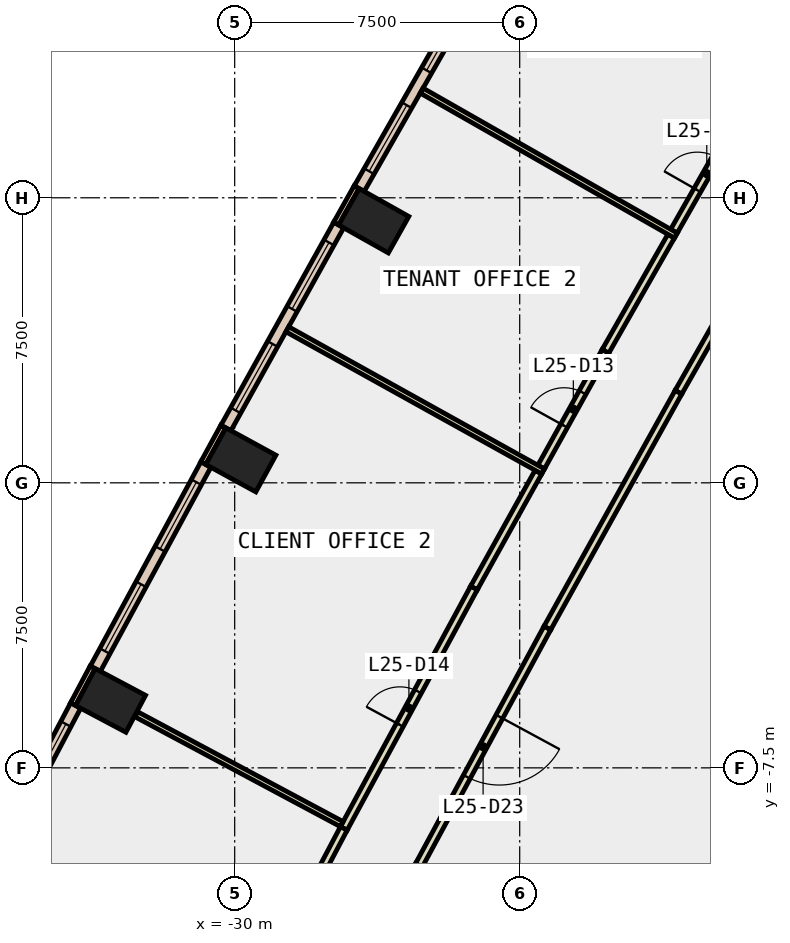
"""IFC4 building model, lengths in metres.
Left out: names, types, materials, properties, quantities, classifications, styles, units other than length and angle.
Written with IfcOpenShell. Run it as: python <this file> out.ifc"""

import sys

from ifc_helpers import new_model, si_unit, direction, frame, frame_2d, origin, origin_2d, place, context, subcontext, project, spatial, rectangle, extrude, element, fill, save


model = new_model("IFC4")
c1 = context("Model", 3, precision=1e-05, world=origin(), true_north=direction((0.0, 1.0)))
c2 = subcontext(c1, "Body", "Model", "MODEL_VIEW")
j1 = project(units=[si_unit("LENGTHUNIT", "METRE"), si_unit("PLANEANGLEUNIT", "RADIAN")], contexts=[c1])
p1 = place(None, origin())
s1 = spatial("IfcSite", under=j1, at=p1, CompositionType="ELEMENT")
p2 = place(p1, origin())
s2 = spatial("IfcBuilding", under=s1, at=p2, CompositionType="ELEMENT")
p3 = place(p2, frame((0.0, 0.0, 116.0)))
s3 = spatial("IfcBuildingStorey", under=s2, at=p3, CompositionType="ELEMENT", Elevation=116.0)
for number, where, z_axis, x_axis in (
    (1, (-26.341, 6.896, -0.4), (0.0, 0.0, 1.0), (0.49, 0.872, 0.0)),
    (2, (-29.838, 0.604, -0.4), (0.0, 0.0, 1.0), (0.48, 0.877, 0.0)),
    (3, (-33.266, -5.726, -0.4), (0.0, 0.0, 1.0), (0.469, 0.883, 0.0)),
):
    element("IfcColumn", number, at=place(p3, frame(where, z_axis=z_axis, x_axis=x_axis)), inside=s3, PredefinedType="COLUMN", context=c2, shape_type="SweptSolid", body=[
        extrude(rectangle(XDim=1.1, YDim=1.5, at=origin_2d()), origin(), (0.0, 0.0, 1.0), 4.2),
    ])
p4 = place(p3, frame((-26.791, 7.78, 0.0), z_axis=(0.0, 0.0, 1.0), x_axis=(-0.490008344094, -0.871717742574, 0.0)))
e4 = element("IfcWall", 4, at=p4, inside=s3, PredefinedType="STANDARD", context=c2, shape_type="SweptSolid", body=[
    extrude(rectangle(XDim=1.1, YDim=0.15, at=frame_2d((0.55, 0.0))), origin(), (0.0, 0.0, 1.0), 3.8),
])
p5 = place(p3, frame((-30.298, 1.483, 0.0), z_axis=(0.0, 0.0, 1.0), x_axis=(-0.479566870346, -0.877505337229, 0.0)))
e5 = element("IfcWall", 5, at=p5, inside=s3, PredefinedType="STANDARD", context=c2, shape_type="SweptSolid", body=[
    extrude(rectangle(XDim=1.101, YDim=0.15, at=frame_2d((0.55, 0.0))), origin(), (0.0, 0.0, 1.0), 3.8),
])
p6 = place(p3, frame((-33.737, -4.854, 0.0), z_axis=(0.0, 0.0, 1.0), x_axis=(-0.46919310775, -0.883095593716, 0.0)))
e6 = element("IfcWall", 6, at=p6, inside=s3, PredefinedType="STANDARD", context=c2, shape_type="SweptSolid", body=[
    extrude(rectangle(XDim=1.099, YDim=0.15, at=frame_2d((0.55, 0.0))), origin(), (0.0, 0.0, 1.0), 3.8),
])
p7 = place(p3, frame((-23.698, 13.048, 0.0), z_axis=(0.0, 0.0, 1.0), x_axis=(-0.495114366991, -0.868827810098, 0.0)))
e7 = element("IfcWall", 7, at=p7, inside=s3, PredefinedType="STANDARD", context=c2, shape_type="SweptSolid", body=[
    extrude(rectangle(XDim=6.11, YDim=0.3, at=frame_2d((3.055, 0.0))), origin(), (0.0, 0.0, 1.0), 3.8),
])
p8 = place(p7, frame((0.527, 0.0, 0.9)))
e8 = element("IfcOpeningElement", 8, at=p8, cuts=e7, PredefinedType="OPENING", context=c2, shape_type="SweptSolid", body=[
    extrude(rectangle(XDim=2.0, YDim=2.6, at=frame_2d((1.0, 1.3))), frame((0.0, 0.16, 0.0), z_axis=(0.0, -1.0, 0.0), x_axis=(1.0, 0.0, 0.0)), (0.0, 0.0, 1.0), 0.32),
])
p9 = place(p7, frame((3.582, 0.0, 0.9)))
e9 = element("IfcOpeningElement", 9, at=p9, cuts=e7, PredefinedType="OPENING", context=c2, shape_type="SweptSolid", body=[
    extrude(rectangle(XDim=2.0, YDim=2.6, at=frame_2d((1.0, 1.3))), frame((0.0, 0.16, 0.0), z_axis=(0.0, -1.0, 0.0), x_axis=(1.0, 0.0, 0.0)), (0.0, 0.0, 1.0), 0.32),
])
p10 = place(p3, frame((-27.262, 6.784, 0.0), z_axis=(0.0, 0.0, 1.0), x_axis=(-0.485822751649, -0.874057351654, 0.0)))
e10 = element("IfcWall", 10, at=p10, inside=s3, PredefinedType="STANDARD", context=c2, shape_type="SweptSolid", body=[
    extrude(rectangle(XDim=6.109, YDim=0.3, at=frame_2d((3.055, 0.0))), origin(), (0.0, 0.0, 1.0), 3.8),
])
p11 = place(p10, frame((0.527, 0.0, 0.9)))
e11 = element("IfcOpeningElement", 11, at=p11, cuts=e10, PredefinedType="OPENING", context=c2, shape_type="SweptSolid", body=[
    extrude(rectangle(XDim=2.0, YDim=2.6, at=frame_2d((1.0, 1.3))), frame((0.0, 0.16, 0.0), z_axis=(0.0, -1.0, 0.0), x_axis=(1.0, 0.0, 0.0)), (0.0, 0.0, 1.0), 0.32),
])
p12 = place(p10, frame((3.582, 0.0, 0.9)))
e12 = element("IfcOpeningElement", 12, at=p12, cuts=e10, PredefinedType="OPENING", context=c2, shape_type="SweptSolid", body=[
    extrude(rectangle(XDim=2.0, YDim=2.6, at=frame_2d((1.0, 1.3))), frame((0.0, 0.16, 0.0), z_axis=(0.0, -1.0, 0.0), x_axis=(1.0, 0.0, 0.0)), (0.0, 0.0, 1.0), 0.32),
])
p13 = place(p3, frame((-30.758, 0.481, 0.0), z_axis=(0.0, 0.0, 1.0), x_axis=(-0.476097776444, -0.879392351152, 0.0)))
e13 = element("IfcWall", 13, at=p13, inside=s3, PredefinedType="STANDARD", context=c2, shape_type="SweptSolid", body=[
    extrude(rectangle(XDim=6.11, YDim=0.3, at=frame_2d((3.055, 0.0))), origin(), (0.0, 0.0, 1.0), 3.8),
])
p14 = place(p13, frame((0.527, 0.0, 0.9)))
e14 = element("IfcOpeningElement", 14, at=p14, cuts=e13, PredefinedType="OPENING", context=c2, shape_type="SweptSolid", body=[
    extrude(rectangle(XDim=2.0, YDim=2.6, at=frame_2d((1.0, 1.3))), frame((0.0, 0.16, 0.0), z_axis=(0.0, -1.0, 0.0), x_axis=(1.0, 0.0, 0.0)), (0.0, 0.0, 1.0), 0.32),
])
p15 = place(p13, frame((3.582, 0.0, 0.9)))
e15 = element("IfcOpeningElement", 15, at=p15, cuts=e13, PredefinedType="OPENING", context=c2, shape_type="SweptSolid", body=[
    extrude(rectangle(XDim=2.0, YDim=2.6, at=frame_2d((1.0, 1.3))), frame((0.0, 0.16, 0.0), z_axis=(0.0, -1.0, 0.0), x_axis=(1.0, 0.0, 0.0)), (0.0, 0.0, 1.0), 0.32),
])
p16 = place(p3, frame((-34.185, -5.86, 0.0), z_axis=(0.0, 0.0, 1.0), x_axis=(-0.466599547852, -0.88446868907, 0.0)))
e16 = element("IfcWall", 16, at=p16, inside=s3, PredefinedType="STANDARD", context=c2, shape_type="SweptSolid", body=[
    extrude(rectangle(XDim=6.202, YDim=0.3, at=frame_2d((3.101, 0.0))), origin(), (0.0, 0.0, 1.0), 3.8),
])
p17 = place(p16, frame((0.551, 0.0, 0.9)))
e17 = element("IfcOpeningElement", 17, at=p17, cuts=e16, PredefinedType="OPENING", context=c2, shape_type="SweptSolid", body=[
    extrude(rectangle(XDim=2.0, YDim=2.6, at=frame_2d((1.0, 1.3))), frame((0.0, 0.16, 0.0), z_axis=(0.0, -1.0, 0.0), x_axis=(1.0, 0.0, 0.0)), (0.0, 0.0, 1.0), 0.32),
])
p18 = place(p16, frame((3.652, 0.0, 0.9)))
e18 = element("IfcOpeningElement", 18, at=p18, cuts=e16, PredefinedType="OPENING", context=c2, shape_type="SweptSolid", body=[
    extrude(rectangle(XDim=2.0, YDim=2.6, at=frame_2d((1.0, 1.3))), frame((0.0, 0.16, 0.0), z_axis=(0.0, -1.0, 0.0), x_axis=(1.0, 0.0, 0.0)), (0.0, 0.0, 1.0), 0.32),
])
p19 = place(p3, frame((-16.783, 5.088, 0.0), z_axis=(0.0, 0.0, 1.0), x_axis=(-0.495023676383, -0.868879485211, 0.0)))
e19 = element("IfcWall", 19, at=p19, inside=s3, PredefinedType="PARTITIONING", context=c2, shape_type="SweptSolid", body=[
    extrude(rectangle(XDim=3.113, YDim=0.2, at=frame_2d((1.557, 0.0))), origin(), (0.0, 0.0, 1.0), 3.8),
])
p20 = place(p3, frame((-18.324, 2.383, 0.0), z_axis=(0.0, 0.0, 1.0), x_axis=(-0.485826874234, -0.874055060206, 0.0)))
e20 = element("IfcWall", 20, at=p20, inside=s3, PredefinedType="PARTITIONING", context=c2, shape_type="SweptSolid", body=[
    extrude(rectangle(XDim=7.099, YDim=0.2, at=frame_2d((3.55, 0.0))), origin(), (0.0, 0.0, 1.0), 3.8),
])
p21 = place(p3, frame((-21.773, -3.822, 0.0), z_axis=(0.0, 0.0, 1.0), x_axis=(-0.476124717613, -0.87937776483, 0.0)))
e21 = element("IfcWall", 21, at=p21, inside=s3, PredefinedType="PARTITIONING", context=c2, shape_type="SweptSolid", body=[
    extrude(rectangle(XDim=7.099, YDim=0.2, at=frame_2d((3.55, 0.0))), origin(), (0.0, 0.0, 1.0), 3.8),
])
p22 = place(p21, frame((2.65, 0.0, 0.0)))
e22 = element("IfcOpeningElement", 22, at=p22, cuts=e21, PredefinedType="OPENING", context=c2, shape_type="SweptSolid", body=[
    extrude(rectangle(XDim=1.8, YDim=2.1, at=frame_2d((0.9, 1.05))), frame((0.0, 0.11, 0.0), z_axis=(0.0, -1.0, 0.0), x_axis=(1.0, 0.0, 0.0)), (0.0, 0.0, 1.0), 0.22),
])
p23 = place(p3, frame((-25.153, -10.065, 0.0), z_axis=(0.0, 0.0, 1.0), x_axis=(-0.466663976618, -0.884434696813, 0.0)))
e23 = element("IfcWall", 23, at=p23, inside=s3, PredefinedType="PARTITIONING", context=c2, shape_type="SweptSolid", body=[
    extrude(rectangle(XDim=6.501, YDim=0.2, at=frame_2d((3.25, 0.0))), origin(), (0.0, 0.0, 1.0), 3.8),
])
p24 = place(p3, frame((-18.441, 6.621, 0.0), z_axis=(0.0, 0.0, 1.0), x_axis=(0.495286549488, 0.868729666753, 0.0)))
e24 = element("IfcWall", 24, at=p24, inside=s3, PredefinedType="PARTITIONING", context=c2, shape_type="SweptSolid", body=[
    extrude(rectangle(XDim=3.487, YDim=0.2, at=frame_2d((1.743, 0.0))), origin(), (0.0, 0.0, 1.0), 3.8),
])
p25 = place(p24, frame((1.243, 0.0, 0.0)))
e25 = element("IfcOpeningElement", 25, at=p25, cuts=e24, PredefinedType="OPENING", context=c2, shape_type="SweptSolid", body=[
    extrude(rectangle(XDim=1.0, YDim=2.1, at=frame_2d((0.5, 1.05))), frame((0.0, 0.11, 0.0), z_axis=(0.0, -1.0, 0.0), x_axis=(1.0, 0.0, 0.0)), (0.0, 0.0, 1.0), 0.22),
])
p26 = place(p3, frame((-21.936, 0.414, 0.0), z_axis=(0.0, 0.0, 1.0), x_axis=(0.485827202541, 0.874054877723, 0.0)))
e26 = element("IfcWall", 26, at=p26, inside=s3, PredefinedType="PARTITIONING", context=c2, shape_type="SweptSolid", body=[
    extrude(rectangle(XDim=3.487, YDim=0.2, at=frame_2d((1.744, 0.0))), origin(), (0.0, 0.0, 1.0), 3.8),
])
p27 = place(p26, frame((1.244, 0.0, 0.0)))
e27 = element("IfcOpeningElement", 27, at=p27, cuts=e26, PredefinedType="OPENING", context=c2, shape_type="SweptSolid", body=[
    extrude(rectangle(XDim=1.0, YDim=2.1, at=frame_2d((0.5, 1.05))), frame((0.0, 0.11, 0.0), z_axis=(0.0, -1.0, 0.0), x_axis=(1.0, 0.0, 0.0)), (0.0, 0.0, 1.0), 0.22),
])
p28 = place(p3, frame((-20.242, 3.462, 0.0), z_axis=(0.0, 0.0, 1.0), x_axis=(0.495309264725, 0.868716715781, 0.0)))
e28 = element("IfcWall", 28, at=p28, inside=s3, PredefinedType="PARTITIONING", context=c2, shape_type="SweptSolid", body=[
    extrude(rectangle(XDim=3.487, YDim=0.2, at=frame_2d((1.743, 0.0))), origin(), (0.0, 0.0, 1.0), 3.8),
])
p29 = place(p3, frame((-27.129, -9.094, 0.0), z_axis=(0.0, 0.0, 1.0), x_axis=(0.476090835435, 0.879396108938, 0.0)))
e29 = element("IfcWall", 29, at=p29, inside=s3, PredefinedType="PARTITIONING", context=c2, shape_type="SweptSolid", body=[
    extrude(rectangle(XDim=7.198, YDim=0.2, at=frame_2d((3.599, 0.0))), origin(), (0.0, 0.0, 1.0), 3.8),
])
p30 = place(p29, frame((3.099, 0.0, 0.0)))
e30 = element("IfcOpeningElement", 30, at=p30, cuts=e29, PredefinedType="OPENING", context=c2, shape_type="SweptSolid", body=[
    extrude(rectangle(XDim=1.0, YDim=2.1, at=frame_2d((0.5, 1.05))), frame((0.0, 0.11, 0.0), z_axis=(0.0, -1.0, 0.0), x_axis=(1.0, 0.0, 0.0)), (0.0, 0.0, 1.0), 0.22),
])
p31 = place(p3, frame((-23.702, -2.764, 0.0), z_axis=(0.0, 0.0, 1.0), x_axis=(0.485892653581, 0.874018494767, 0.0)))
e31 = element("IfcWall", 31, at=p31, inside=s3, PredefinedType="PARTITIONING", context=c2, shape_type="SweptSolid", body=[
    extrude(rectangle(XDim=3.486, YDim=0.2, at=frame_2d((1.743, 0.0))), origin(), (0.0, 0.0, 1.0), 3.8),
])
p32 = place(p3, frame((-30.221, -14.956, 0.0), z_axis=(0.0, 0.0, 1.0), x_axis=(0.466543318111, 0.884498350663, 0.0)))
e32 = element("IfcWall", 32, at=p32, inside=s3, PredefinedType="PARTITIONING", context=c2, shape_type="SweptSolid", body=[
    extrude(rectangle(XDim=6.627, YDim=0.2, at=frame_2d((3.314, 0.0))), origin(), (0.0, 0.0, 1.0), 3.8),
])
p33 = place(p32, frame((2.889, 0.0, 0.0)))
e33 = element("IfcOpeningElement", 33, at=p33, cuts=e32, PredefinedType="OPENING", context=c2, shape_type="SweptSolid", body=[
    extrude(rectangle(XDim=1.0, YDim=2.1, at=frame_2d((0.5, 1.05))), frame((0.0, 0.11, 0.0), z_axis=(0.0, -1.0, 0.0), x_axis=(1.0, 0.0, 0.0)), (0.0, 0.0, 1.0), 0.22),
])
p34 = place(p3, frame((-18.391, 6.506, 0.0), z_axis=(0.0, 0.0, 1.0), x_axis=(-0.868738258528, 0.495271479261, 0.0)))
e34 = element("IfcWall", 34, at=p34, inside=s3, PredefinedType="PARTITIONING", context=c2, shape_type="SweptSolid", body=[
    extrude(rectangle(XDim=7.701, YDim=0.15, at=frame_2d((3.85, 0.0))), origin(), (0.0, 0.0, 1.0), 3.8),
])
p35 = place(p3, frame((-21.885, 0.3, 0.0), z_axis=(0.0, 0.0, 1.0), x_axis=(-0.874095944746, 0.485753311237, 0.0)))
e35 = element("IfcWall", 35, at=p35, inside=s3, PredefinedType="PARTITIONING", context=c2, shape_type="SweptSolid", body=[
    extrude(rectangle(XDim=7.699, YDim=0.15, at=frame_2d((3.85, 0.0))), origin(), (0.0, 0.0, 1.0), 3.8),
])
p36 = place(p3, frame((-27.182, -8.981, 0.0), z_axis=(0.0, 0.0, 1.0), x_axis=(-0.881899408669, 0.471437623647, 0.0)))
e36 = element("IfcWall", 36, at=p36, inside=s3, PredefinedType="PARTITIONING", context=c2, shape_type="SweptSolid", body=[
    extrude(rectangle(XDim=6.13, YDim=0.15, at=frame_2d((3.065, 0.0))), origin(), (0.0, 0.0, 1.0), 3.8),
])
p37 = place(p8, origin())
e37 = element("IfcWindow", 37, at=p37, inside=s3, PartitioningType="SINGLE_PANEL", PredefinedType="WINDOW", context=c2, shape_type="SweptSolid", body=[
    extrude(rectangle(XDim=2.0, YDim=2.6, at=frame_2d((1.0, 1.3))), frame((0.0, 0.03, 0.0), z_axis=(0.0, -1.0, 0.0), x_axis=(1.0, 0.0, 0.0)), (0.0, 0.0, 1.0), 0.06),
])
fill(e8, e37)
p38 = place(p9, origin())
e38 = element("IfcWindow", 38, at=p38, inside=s3, PartitioningType="SINGLE_PANEL", PredefinedType="WINDOW", context=c2, shape_type="SweptSolid", body=[
    extrude(rectangle(XDim=2.0, YDim=2.6, at=frame_2d((1.0, 1.3))), frame((0.0, 0.03, 0.0), z_axis=(0.0, -1.0, 0.0), x_axis=(1.0, 0.0, 0.0)), (0.0, 0.0, 1.0), 0.06),
])
fill(e9, e38)
p39 = place(p11, origin())
e39 = element("IfcWindow", 39, at=p39, inside=s3, PartitioningType="SINGLE_PANEL", PredefinedType="WINDOW", context=c2, shape_type="SweptSolid", body=[
    extrude(rectangle(XDim=2.0, YDim=2.6, at=frame_2d((1.0, 1.3))), frame((0.0, 0.03, 0.0), z_axis=(0.0, -1.0, 0.0), x_axis=(1.0, 0.0, 0.0)), (0.0, 0.0, 1.0), 0.06),
])
fill(e11, e39)
p40 = place(p12, origin())
e40 = element("IfcWindow", 40, at=p40, inside=s3, PartitioningType="SINGLE_PANEL", PredefinedType="WINDOW", context=c2, shape_type="SweptSolid", body=[
    extrude(rectangle(XDim=2.0, YDim=2.6, at=frame_2d((1.0, 1.3))), frame((0.0, 0.03, 0.0), z_axis=(0.0, -1.0, 0.0), x_axis=(1.0, 0.0, 0.0)), (0.0, 0.0, 1.0), 0.06),
])
fill(e12, e40)
p41 = place(p14, origin())
e41 = element("IfcWindow", 41, at=p41, inside=s3, PartitioningType="SINGLE_PANEL", PredefinedType="WINDOW", context=c2, shape_type="SweptSolid", body=[
    extrude(rectangle(XDim=2.0, YDim=2.6, at=frame_2d((1.0, 1.3))), frame((0.0, 0.03, 0.0), z_axis=(0.0, -1.0, 0.0), x_axis=(1.0, 0.0, 0.0)), (0.0, 0.0, 1.0), 0.06),
])
fill(e14, e41)
p42 = place(p15, origin())
e42 = element("IfcWindow", 42, at=p42, inside=s3, PartitioningType="SINGLE_PANEL", PredefinedType="WINDOW", context=c2, shape_type="SweptSolid", body=[
    extrude(rectangle(XDim=2.0, YDim=2.6, at=frame_2d((1.0, 1.3))), frame((0.0, 0.03, 0.0), z_axis=(0.0, -1.0, 0.0), x_axis=(1.0, 0.0, 0.0)), (0.0, 0.0, 1.0), 0.06),
])
fill(e15, e42)
p43 = place(p17, origin())
e43 = element("IfcWindow", 43, at=p43, inside=s3, PartitioningType="SINGLE_PANEL", PredefinedType="WINDOW", context=c2, shape_type="SweptSolid", body=[
    extrude(rectangle(XDim=2.0, YDim=2.6, at=frame_2d((1.0, 1.3))), frame((0.0, 0.03, 0.0), z_axis=(0.0, -1.0, 0.0), x_axis=(1.0, 0.0, 0.0)), (0.0, 0.0, 1.0), 0.06),
])
fill(e17, e43)
p44 = place(p25, origin())
e44 = element("IfcDoor", 44, at=p44, inside=s3, OperationType="SINGLE_SWING_RIGHT", PredefinedType="DOOR", context=c2, shape_type="SweptSolid", body=[
    extrude(rectangle(XDim=1.0, YDim=2.1, at=frame_2d((0.5, 1.05))), frame((0.0, 0.025, 0.0), z_axis=(0.0, -1.0, 0.0), x_axis=(1.0, 0.0, 0.0)), (0.0, 0.0, 1.0), 0.05),
])
fill(e25, e44)
p45 = place(p27, origin())
e45 = element("IfcDoor", 45, at=p45, inside=s3, OperationType="SINGLE_SWING_RIGHT", PredefinedType="DOOR", context=c2, shape_type="SweptSolid", body=[
    extrude(rectangle(XDim=1.0, YDim=2.1, at=frame_2d((0.5, 1.05))), frame((0.0, 0.025, 0.0), z_axis=(0.0, -1.0, 0.0), x_axis=(1.0, 0.0, 0.0)), (0.0, 0.0, 1.0), 0.05),
])
fill(e27, e45)
p46 = place(p30, origin())
e46 = element("IfcDoor", 46, at=p46, inside=s3, OperationType="SINGLE_SWING_RIGHT", PredefinedType="DOOR", context=c2, shape_type="SweptSolid", body=[
    extrude(rectangle(XDim=1.0, YDim=2.1, at=frame_2d((0.5, 1.05))), frame((0.0, 0.025, 0.0), z_axis=(0.0, -1.0, 0.0), x_axis=(1.0, 0.0, 0.0)), (0.0, 0.0, 1.0), 0.05),
])
fill(e30, e46)
p47 = place(p22, origin())
e47 = element("IfcDoor", 47, at=p47, inside=s3, OperationType="DOUBLE_DOOR_SINGLE_SWING", PredefinedType="DOOR", context=c2, shape_type="SweptSolid", body=[
    extrude(rectangle(XDim=1.8, YDim=2.1, at=frame_2d((0.9, 1.05))), frame((0.0, 0.025, 0.0), z_axis=(0.0, -1.0, 0.0), x_axis=(1.0, 0.0, 0.0)), (0.0, 0.0, 1.0), 0.05),
])
fill(e22, e47)
save(model, sys.argv[1])
